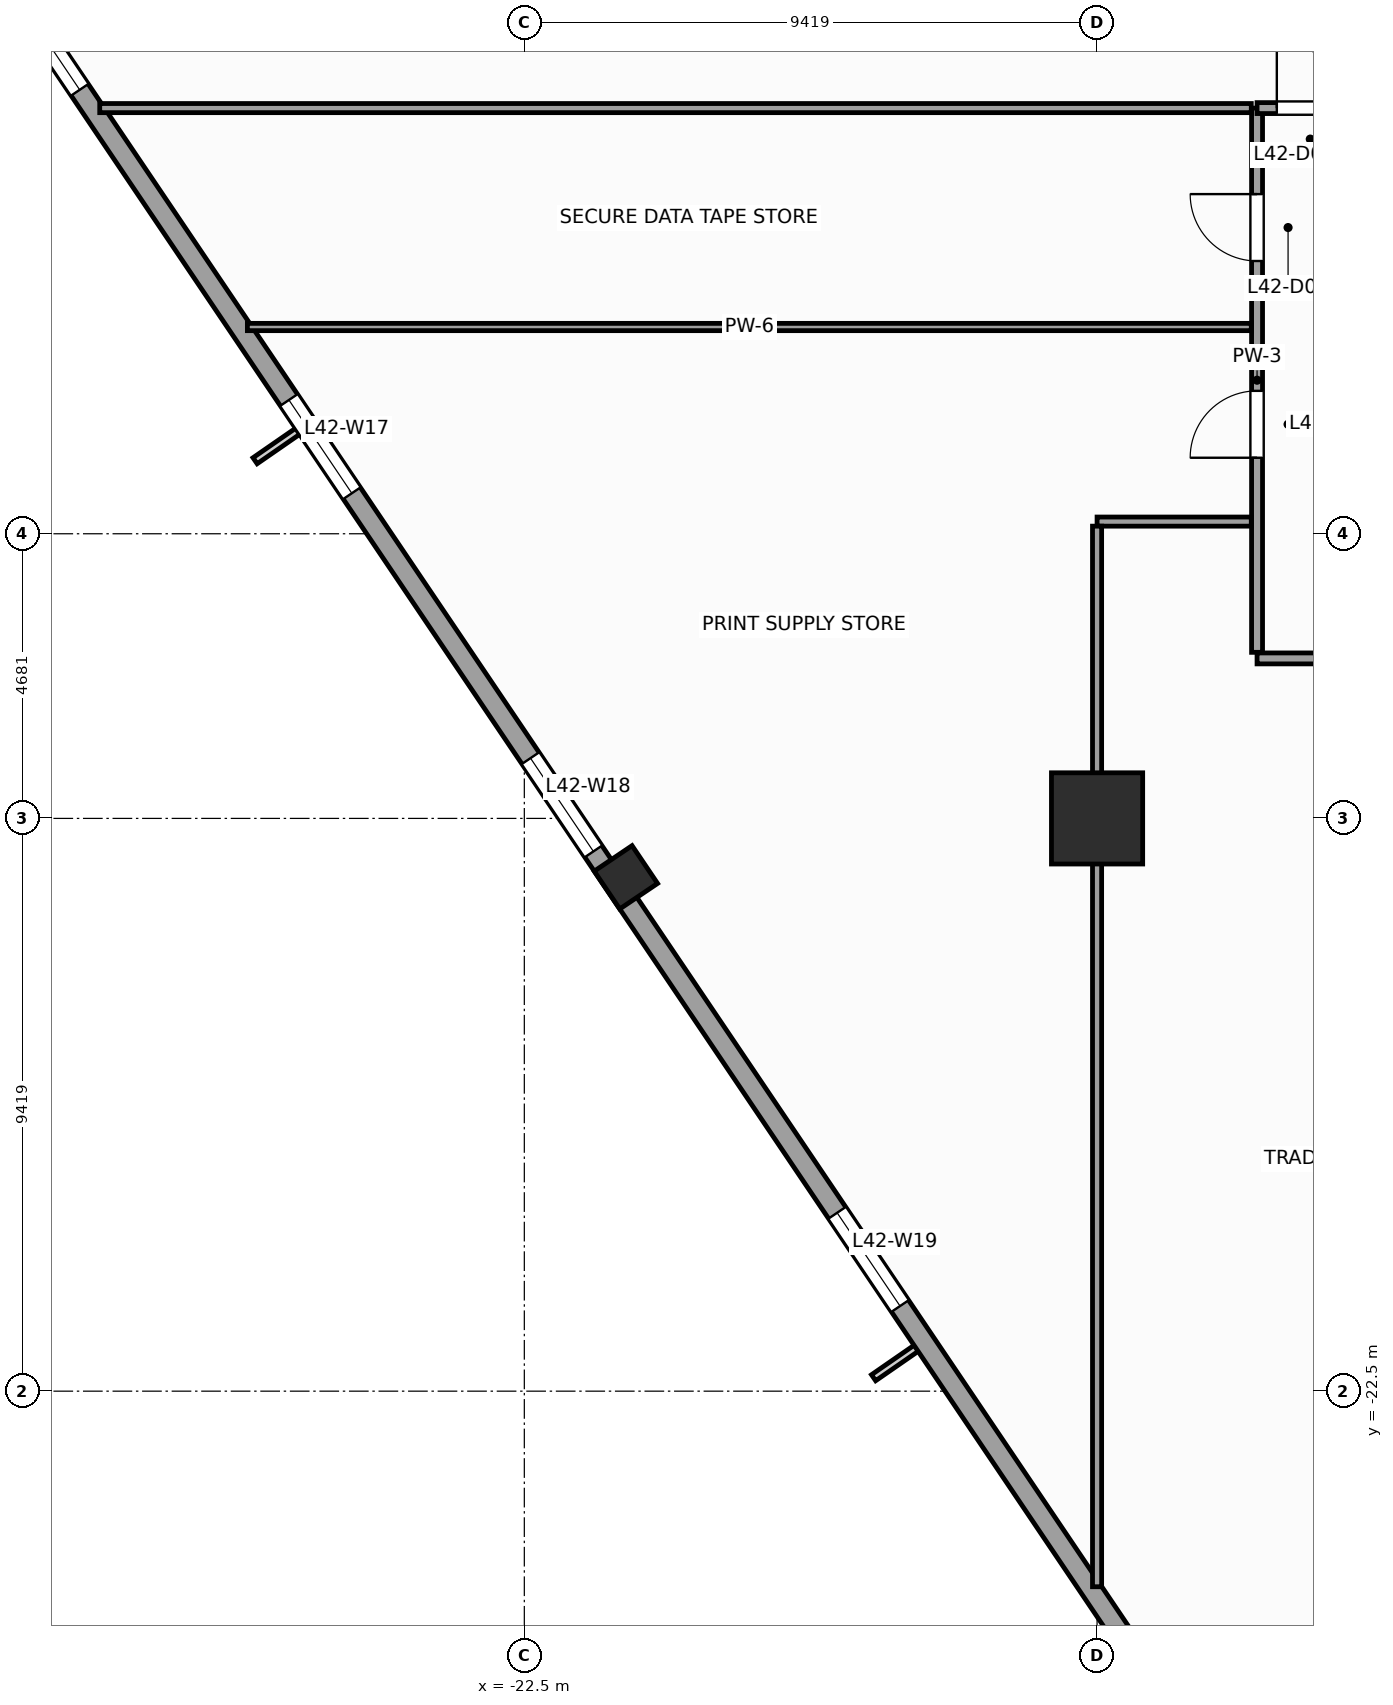
"""IFC4 building model, lengths in metres.
Left out: names, types, materials, properties, quantities, classifications, styles, units other than length and angle.
Written with IfcOpenShell. Run it as: python <this file> out.ifc"""

import sys

from ifc_helpers import new_model, si_unit, direction, frame, frame_2d, origin, origin_2d, place, context, subcontext, project, spatial, rectangle, extrude, source, transform, mapped, element, fill, save


model = new_model("IFC4")
c1 = context("Model", 3, precision=1e-05, world=origin(), true_north=direction((0.0, 1.0)))
c2 = subcontext(c1, "Body", "Model", "MODEL_VIEW")
j1 = project(units=[si_unit("LENGTHUNIT", "METRE"), si_unit("PLANEANGLEUNIT", "RADIAN")], contexts=[c1])
p1 = place(None, origin())
s1 = spatial("IfcSite", under=j1, at=p1, CompositionType="ELEMENT")
p2 = place(p1, origin())
s2 = spatial("IfcBuilding", under=s1, at=p2, CompositionType="ELEMENT")
p3 = place(p2, frame((0.0, 0.0, 176.4)))
s3 = spatial("IfcBuildingStorey", under=s2, at=p3, CompositionType="ELEMENT", Elevation=176.4)
m1 = source(origin(), c2, "Body", "SweptSolid", [
    extrude(rectangle(XDim=1.5, YDim=1.5, at=origin_2d()), origin(), (0.0, 0.0, 1.0), 4.0),
])
p4 = place(p3, frame((-13.081, -13.081, 0.0), z_axis=(0.0, 0.0, 1.0), x_axis=(1.0, 0.0, 0.0)))
e1 = element("IfcColumn", 1, at=p4, inside=s3, PredefinedType="COLUMN", context=c2, shape_type="MappedRepresentation", body=[
    mapped(m1, transform((0.0, 0.0, 0.0), scale=1.0)),
])
m2 = source(origin(), c2, "Body", "SweptSolid", [
    extrude(rectangle(XDim=0.75, YDim=0.75, at=origin_2d()), origin(), (0.0, 0.0, 1.0), 4.0),
])
p5 = place(p3, frame((-20.83, -14.05, 0.0), z_axis=(0.0, 0.0, 1.0), x_axis=(0.829037572555, 0.559192903471, 0.0)))
e2 = element("IfcColumn", 2, at=p5, inside=s3, PredefinedType="COLUMN", context=c2, shape_type="MappedRepresentation", body=[
    mapped(m2, transform((0.0, 0.0, 0.0), scale=1.0)),
])
p6 = place(p3, frame((-32.558, 2.972, 0.0), z_axis=(0.0, 0.0, 1.0), x_axis=(0.559194910251, -0.829036218961, 0.0)))
e3 = element("IfcWall", 3, at=p6, inside=s3, PredefinedType="STANDARD", context=c2, shape_type="SweptSolid", body=[
    extrude(rectangle(XDim=41.34, YDim=0.34, at=frame_2d((20.67, 0.0))), origin(), (0.0, 0.0, 1.0), 3.04),
])
p7 = place(p6, frame((3.511, 0.0, 0.56)))
e4 = element("IfcOpeningElement", 4, at=p7, cuts=e3, PredefinedType="OPENING", context=c2, shape_type="SweptSolid", body=[
    extrude(rectangle(XDim=1.4, YDim=2.4, at=frame_2d((0.7, 1.2))), frame((0.0, 0.18, 0.0), z_axis=(0.0, -1.0, 0.0), x_axis=(1.0, 0.0, 0.0)), (0.0, 0.0, 1.0), 0.36),
])
p8 = place(p6, frame((11.064, 0.0, 0.61)))
e5 = element("IfcOpeningElement", 5, at=p8, cuts=e3, PredefinedType="OPENING", context=c2, shape_type="SweptSolid", body=[
    extrude(rectangle(XDim=1.85, YDim=2.35, at=frame_2d((0.925, 1.175))), frame((0.0, 0.18, 0.0), z_axis=(0.0, -1.0, 0.0), x_axis=(1.0, 0.0, 0.0)), (0.0, 0.0, 1.0), 0.36),
])
p9 = place(p6, frame((18.168, 0.0, 0.61)))
e6 = element("IfcOpeningElement", 6, at=p9, cuts=e3, PredefinedType="OPENING", context=c2, shape_type="SweptSolid", body=[
    extrude(rectangle(XDim=1.85, YDim=2.35, at=frame_2d((0.925, 1.175))), frame((0.0, 0.18, 0.0), z_axis=(0.0, -1.0, 0.0), x_axis=(1.0, 0.0, 0.0)), (0.0, 0.0, 1.0), 0.36),
])
p10 = place(p6, frame((27.186, 0.0, 0.61)))
e7 = element("IfcOpeningElement", 7, at=p10, cuts=e3, PredefinedType="OPENING", context=c2, shape_type="SweptSolid", body=[
    extrude(rectangle(XDim=1.85, YDim=2.35, at=frame_2d((0.925, 1.175))), frame((0.0, 0.18, 0.0), z_axis=(0.0, -1.0, 0.0), x_axis=(1.0, 0.0, 0.0)), (0.0, 0.0, 1.0), 0.36),
])
p11 = place(p6, frame((35.602, 0.0, 0.56)))
e8 = element("IfcOpeningElement", 8, at=p11, cuts=e3, PredefinedType="OPENING", context=c2, shape_type="SweptSolid", body=[
    extrude(rectangle(XDim=1.4, YDim=2.4, at=frame_2d((0.7, 1.2))), frame((0.0, 0.18, 0.0), z_axis=(0.0, -1.0, 0.0), x_axis=(1.0, 0.0, 0.0)), (0.0, 0.0, 1.0), 0.36),
])
p12 = place(p3, frame((-10.45, -10.45, 0.0), z_axis=(0.0, 0.0, 1.0), x_axis=(1.0, 0.0, 0.0)))
e9 = element("IfcWall", 9, at=p12, inside=s3, PredefinedType="PARTITIONING", context=c2, shape_type="SweptSolid", body=[
    extrude(rectangle(XDim=22.05, YDim=0.18, at=frame_2d((11.025, 0.0))), origin(), (0.0, 0.0, 1.0), 3.74),
])
p13 = place(p12, frame((15.086, 0.0, 0.0)))
e10 = element("IfcOpeningElement", 10, at=p13, cuts=e9, PredefinedType="OPENING", context=c2, shape_type="SweptSolid", body=[
    extrude(rectangle(XDim=0.95, YDim=2.1, at=frame_2d((0.475, 1.05))), frame((0.0, 0.1, 0.0), z_axis=(0.0, -1.0, 0.0), x_axis=(1.0, 0.0, 0.0)), (0.0, 0.0, 1.0), 0.2),
])
p14 = place(p12, frame((7.611, 0.0, 0.0)))
e11 = element("IfcOpeningElement", 11, at=p14, cuts=e9, PredefinedType="OPENING", context=c2, shape_type="SweptSolid", body=[
    extrude(rectangle(XDim=0.95, YDim=2.1, at=frame_2d((0.475, 1.05))), frame((0.0, 0.1, 0.0), z_axis=(0.0, -1.0, 0.0), x_axis=(1.0, 0.0, 0.0)), (0.0, 0.0, 1.0), 0.2),
])
p15 = place(p12, frame((2.939, 0.0, 0.0)))
e12 = element("IfcOpeningElement", 12, at=p15, cuts=e9, PredefinedType="OPENING", context=c2, shape_type="SweptSolid", body=[
    extrude(rectangle(XDim=1.1, YDim=2.2, at=frame_2d((0.55, 1.1))), frame((0.0, 0.1, 0.0), z_axis=(0.0, -1.0, 0.0), x_axis=(1.0, 0.0, 0.0)), (0.0, 0.0, 1.0), 0.2),
])
p16 = place(p12, frame((11.175, 0.0, 0.0)))
e13 = element("IfcOpeningElement", 13, at=p16, cuts=e9, PredefinedType="OPENING", context=c2, shape_type="SweptSolid", body=[
    extrude(rectangle(XDim=1.1, YDim=2.2, at=frame_2d((0.55, 1.1))), frame((0.0, 0.1, 0.0), z_axis=(0.0, -1.0, 0.0), x_axis=(1.0, 0.0, 0.0)), (0.0, 0.0, 1.0), 0.2),
])
p17 = place(p12, frame((18.805, 0.0, 0.0)))
e14 = element("IfcOpeningElement", 14, at=p17, cuts=e9, PredefinedType="OPENING", context=c2, shape_type="SweptSolid", body=[
    extrude(rectangle(XDim=1.1, YDim=2.2, at=frame_2d((0.55, 1.1))), frame((0.0, 0.1, 0.0), z_axis=(0.0, -1.0, 0.0), x_axis=(1.0, 0.0, 0.0)), (0.0, 0.0, 1.0), 0.2),
])
p18 = place(p3, frame((-10.45, -10.35, 0.0), z_axis=(0.0, 0.0, 1.0), x_axis=(0.0, 1.0, 0.0)))
e15 = element("IfcWall", 15, at=p18, inside=s3, PredefinedType="PARTITIONING", context=c2, shape_type="SweptSolid", body=[
    extrude(rectangle(XDim=8.95, YDim=0.18, at=frame_2d((4.475, 0.0))), origin(), (0.0, 0.0, 1.0), 3.74),
])
p19 = place(p18, frame((6.436, 0.0, 0.0)))
e16 = element("IfcOpeningElement", 16, at=p19, cuts=e15, PredefinedType="OPENING", context=c2, shape_type="SweptSolid", body=[
    extrude(rectangle(XDim=1.1, YDim=2.2, at=frame_2d((0.55, 1.1))), frame((0.0, 0.1, 0.0), z_axis=(0.0, -1.0, 0.0), x_axis=(1.0, 0.0, 0.0)), (0.0, 0.0, 1.0), 0.2),
])
p20 = place(p18, frame((3.2, 0.0, 0.0)))
e17 = element("IfcOpeningElement", 17, at=p20, cuts=e15, PredefinedType="OPENING", context=c2, shape_type="SweptSolid", body=[
    extrude(rectangle(XDim=1.1, YDim=2.2, at=frame_2d((0.55, 1.1))), frame((0.0, 0.1, 0.0), z_axis=(0.0, -1.0, 0.0), x_axis=(1.0, 0.0, 0.0)), (0.0, 0.0, 1.0), 0.2),
])
p21 = place(p3, frame((-10.45, -1.4, 0.0), z_axis=(0.0, 0.0, 1.0), x_axis=(1.0, 0.0, 0.0)))
e18 = element("IfcWall", 18, at=p21, inside=s3, PredefinedType="PARTITIONING", context=c2, shape_type="SweptSolid", body=[
    extrude(rectangle(XDim=1.75, YDim=0.18, at=frame_2d((0.875, 0.0))), origin(), (0.0, 0.0, 1.0), 3.74),
])
p22 = place(p21, frame((0.325, 0.0, 0.0)))
e19 = element("IfcOpeningElement", 19, at=p22, cuts=e18, PredefinedType="OPENING", context=c2, shape_type="SweptSolid", body=[
    extrude(rectangle(XDim=1.1, YDim=2.2, at=frame_2d((0.55, 1.1))), frame((0.0, 0.1, 0.0), z_axis=(0.0, -1.0, 0.0), x_axis=(1.0, 0.0, 0.0)), (0.0, 0.0, 1.0), 0.2),
])
p23 = place(p3, frame((-29.482, -1.4, 0.0), z_axis=(0.0, 0.0, 1.0), x_axis=(1.0, 0.0, 0.0)))
e20 = element("IfcWall", 20, at=p23, inside=s3, PredefinedType="PARTITIONING", context=c2, shape_type="SweptSolid", body=[
    extrude(rectangle(XDim=18.938, YDim=0.15, at=frame_2d((9.469, 0.0))), origin(), (0.0, 0.0, 1.0), 3.74),
])
p24 = place(p3, frame((-10.545, -8.2, 0.0), z_axis=(0.0, 0.0, 1.0), x_axis=(-1.0, 0.0, 0.0)))
e21 = element("IfcWall", 21, at=p24, inside=s3, PredefinedType="PARTITIONING", context=c2, shape_type="SweptSolid", body=[
    extrude(rectangle(XDim=2.536, YDim=0.15, at=frame_2d((1.268, 0.0))), origin(), (0.0, 0.0, 1.0), 3.74),
])
p25 = place(p3, frame((-13.081, -8.275, 0.0), z_axis=(0.0, 0.0, 1.0), x_axis=(0.0, -1.0, 0.0)))
e22 = element("IfcWall", 22, at=p25, inside=s3, PredefinedType="PARTITIONING", context=c2, shape_type="SweptSolid", body=[
    extrude(rectangle(XDim=17.441, YDim=0.15, at=frame_2d((8.721, 0.0))), origin(), (0.0, 0.0, 1.0), 2.84),
])
p26 = place(p3, frame((-27.054, -5.0, 0.0), z_axis=(0.0, 0.0, 1.0), x_axis=(1.0, 0.0, 0.0)))
e23 = element("IfcWall", 23, at=p26, inside=s3, PredefinedType="PARTITIONING", context=c2, shape_type="SweptSolid", body=[
    extrude(rectangle(XDim=16.509, YDim=0.12, at=frame_2d((8.255, 0.0))), origin(), (0.0, 0.0, 1.0), 3.74),
])
m3 = source(origin(), c2, "Body", "SweptSolid", [
    extrude(rectangle(XDim=1.4, YDim=2.4, at=frame_2d((0.7, 1.2))), frame((0.0, 0.03, 0.0), z_axis=(0.0, -1.0, 0.0), x_axis=(1.0, 0.0, 0.0)), (0.0, 0.0, 1.0), 0.06),
])
p27 = place(p7, origin())
e24 = element("IfcWindow", 24, at=p27, inside=s3, PartitioningType="SINGLE_PANEL", PredefinedType="WINDOW", context=c2, shape_type="MappedRepresentation", body=[
    mapped(m3, transform((0.0, 0.0, 0.0), scale=1.0)),
])
fill(e4, e24)
m4 = source(origin(), c2, "Body", "SweptSolid", [
    extrude(rectangle(XDim=1.85, YDim=2.35, at=frame_2d((0.925, 1.175))), frame((0.0, 0.03, 0.0), z_axis=(0.0, -1.0, 0.0), x_axis=(1.0, 0.0, 0.0)), (0.0, 0.0, 1.0), 0.06),
])
p28 = place(p8, origin())
e25 = element("IfcWindow", 25, at=p28, inside=s3, PartitioningType="SINGLE_PANEL", PredefinedType="WINDOW", context=c2, shape_type="MappedRepresentation", body=[
    mapped(m4, transform((0.0, 0.0, 0.0), scale=1.0)),
])
fill(e5, e25)
p29 = place(p9, origin())
e26 = element("IfcWindow", 26, at=p29, inside=s3, PartitioningType="SINGLE_PANEL", PredefinedType="WINDOW", context=c2, shape_type="MappedRepresentation", body=[
    mapped(m4, transform((0.0, 0.0, 0.0), scale=1.0)),
])
fill(e6, e26)
p30 = place(p10, origin())
e27 = element("IfcWindow", 27, at=p30, inside=s3, PartitioningType="SINGLE_PANEL", PredefinedType="WINDOW", context=c2, shape_type="MappedRepresentation", body=[
    mapped(m4, transform((0.0, 0.0, 0.0), scale=1.0)),
])
fill(e7, e27)
m5 = source(origin(), c2, "Body", "SweptSolid", [
    extrude(rectangle(XDim=1.1, YDim=2.2, at=frame_2d((0.55, 1.1))), frame((0.0, 0.025, 0.0), z_axis=(0.0, -1.0, 0.0), x_axis=(1.0, 0.0, 0.0)), (0.0, 0.0, 1.0), 0.05),
])
p31 = place(p22, origin())
e28 = element("IfcDoor", 28, at=p31, inside=s3, OperationType="SINGLE_SWING_LEFT", PredefinedType="DOOR", context=c2, shape_type="MappedRepresentation", body=[
    mapped(m5, transform((0.0, 0.0, 0.0), scale=1.0)),
])
fill(e19, e28)
p32 = place(p19, origin())
e29 = element("IfcDoor", 29, at=p32, inside=s3, OperationType="SINGLE_SWING_RIGHT", PredefinedType="DOOR", context=c2, shape_type="MappedRepresentation", body=[
    mapped(m5, transform((0.0, 0.0, 0.0), scale=1.0)),
])
fill(e16, e29)
p33 = place(p20, origin())
e30 = element("IfcDoor", 30, at=p33, inside=s3, OperationType="SINGLE_SWING_LEFT", PredefinedType="DOOR", context=c2, shape_type="MappedRepresentation", body=[
    mapped(m5, transform((0.0, 0.0, 0.0), scale=1.0)),
])
fill(e17, e30)
save(model, sys.argv[1])
